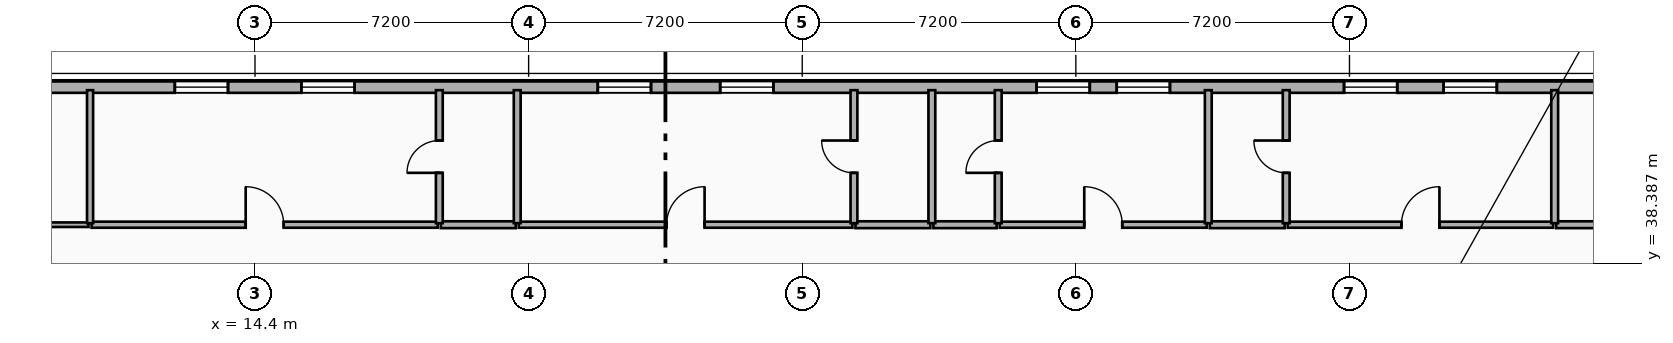
"""IFC4 building model, lengths in metres.
Left out: names, types, materials, properties, quantities, classifications, styles, units other than length and angle.
Written with IfcOpenShell. Run it as: python <this file> out.ifc"""

import sys

from ifc_helpers import new_model, si_unit, direction, frame, frame_2d, origin, place, context, subcontext, project, spatial, rectangle, extrude, element, fill, save


model = new_model("IFC4")
c1 = context("Model", 3, precision=1e-05, world=origin(), true_north=direction((0.0, 1.0)))
c2 = subcontext(c1, "Body", "Model", "MODEL_VIEW")
j1 = project(units=[si_unit("LENGTHUNIT", "METRE"), si_unit("PLANEANGLEUNIT", "RADIAN")], contexts=[c1])
p1 = place(None, origin())
s1 = spatial("IfcSite", under=j1, at=p1, CompositionType="ELEMENT")
p2 = place(p1, origin())
s2 = spatial("IfcBuilding", under=s1, at=p2, CompositionType="ELEMENT")
p3 = place(p2, frame((0.0, 0.0, 108.3)))
s3 = spatial("IfcBuildingStorey", under=s2, at=p3, CompositionType="ELEMENT", Elevation=108.3)
p4 = place(p3, frame((4.2, 43.02, 0.0), z_axis=(0.0, 0.0, 1.0), x_axis=(1.0, 0.0, 0.0)))
e1 = element("IfcWall", 1, at=p4, inside=s3, PredefinedType="SOLIDWALL", context=c2, shape_type="SweptSolid", body=[
    extrude(rectangle(XDim=49.2, YDim=0.3, at=frame_2d((24.6, 0.0))), origin(), (0.0, 0.0, 1.0), 3.24),
])
p5 = place(p4, frame((8.09, 0.0, 0.85)))
e2 = element("IfcOpeningElement", 2, at=p5, cuts=e1, PredefinedType="OPENING", context=c2, shape_type="SweptSolid", body=[
    extrude(rectangle(XDim=1.4, YDim=1.8, at=frame_2d((0.7, 0.9))), frame((0.0, 0.16, 0.0), z_axis=(0.0, -1.0, 0.0), x_axis=(1.0, 0.0, 0.0)), (0.0, 0.0, 1.0), 0.32),
])
p6 = place(p4, frame((11.42, 0.0, 0.85)))
e3 = element("IfcOpeningElement", 3, at=p6, cuts=e1, PredefinedType="OPENING", context=c2, shape_type="SweptSolid", body=[
    extrude(rectangle(XDim=1.4, YDim=1.8, at=frame_2d((0.7, 0.9))), frame((0.0, 0.16, 0.0), z_axis=(0.0, -1.0, 0.0), x_axis=(1.0, 0.0, 0.0)), (0.0, 0.0, 1.0), 0.32),
])
p7 = place(p4, frame((19.22, 0.0, 0.85)))
e4 = element("IfcOpeningElement", 4, at=p7, cuts=e1, PredefinedType="OPENING", context=c2, shape_type="SweptSolid", body=[
    extrude(rectangle(XDim=1.4, YDim=1.8, at=frame_2d((0.7, 0.9))), frame((0.0, 0.16, 0.0), z_axis=(0.0, -1.0, 0.0), x_axis=(1.0, 0.0, 0.0)), (0.0, 0.0, 1.0), 0.32),
])
p8 = place(p4, frame((22.441, 0.0, 0.85)))
e5 = element("IfcOpeningElement", 5, at=p8, cuts=e1, PredefinedType="OPENING", context=c2, shape_type="SweptSolid", body=[
    extrude(rectangle(XDim=1.4, YDim=1.8, at=frame_2d((0.7, 0.9))), frame((0.0, 0.16, 0.0), z_axis=(0.0, -1.0, 0.0), x_axis=(1.0, 0.0, 0.0)), (0.0, 0.0, 1.0), 0.32),
])
p9 = place(p4, frame((30.766, 0.0, 0.85)))
e6 = element("IfcOpeningElement", 6, at=p9, cuts=e1, PredefinedType="OPENING", context=c2, shape_type="SweptSolid", body=[
    extrude(rectangle(XDim=1.4, YDim=1.8, at=frame_2d((0.7, 0.9))), frame((0.0, 0.16, 0.0), z_axis=(0.0, -1.0, 0.0), x_axis=(1.0, 0.0, 0.0)), (0.0, 0.0, 1.0), 0.32),
])
p10 = place(p4, frame((32.876, 0.0, 0.85)))
e7 = element("IfcOpeningElement", 7, at=p10, cuts=e1, PredefinedType="OPENING", context=c2, shape_type="SweptSolid", body=[
    extrude(rectangle(XDim=1.4, YDim=1.8, at=frame_2d((0.7, 0.9))), frame((0.0, 0.16, 0.0), z_axis=(0.0, -1.0, 0.0), x_axis=(1.0, 0.0, 0.0)), (0.0, 0.0, 1.0), 0.32),
])
p11 = place(p4, frame((38.857, 0.0, 0.85)))
e8 = element("IfcOpeningElement", 8, at=p11, cuts=e1, PredefinedType="OPENING", context=c2, shape_type="SweptSolid", body=[
    extrude(rectangle(XDim=1.4, YDim=1.8, at=frame_2d((0.7, 0.9))), frame((0.0, 0.16, 0.0), z_axis=(0.0, -1.0, 0.0), x_axis=(1.0, 0.0, 0.0)), (0.0, 0.0, 1.0), 0.32),
])
p12 = place(p4, frame((41.478, 0.0, 0.85)))
e9 = element("IfcOpeningElement", 9, at=p12, cuts=e1, PredefinedType="OPENING", context=c2, shape_type="SweptSolid", body=[
    extrude(rectangle(XDim=1.4, YDim=1.8, at=frame_2d((0.7, 0.9))), frame((0.0, 0.16, 0.0), z_axis=(0.0, -1.0, 0.0), x_axis=(1.0, 0.0, 0.0)), (0.0, 0.0, 1.0), 0.32),
])
p13 = place(p4, frame((47.115, 0.0, 0.85)))
e10 = element("IfcOpeningElement", 10, at=p13, cuts=e1, PredefinedType="OPENING", context=c2, shape_type="SweptSolid", body=[
    extrude(rectangle(XDim=1.4, YDim=1.8, at=frame_2d((0.7, 0.9))), frame((0.0, 0.16, 0.0), z_axis=(0.0, -1.0, 0.0), x_axis=(1.0, 0.0, 0.0)), (0.0, 0.0, 1.0), 0.32),
])
p14 = place(p3, frame((0.26, 39.4, 0.0), z_axis=(0.0, 0.0, 1.0), x_axis=(1.0, 0.0, 0.0)))
e11 = element("IfcWall", 11, at=p14, inside=s3, PredefinedType="PARTITIONING", context=c2, shape_type="SweptSolid", body=[
    extrude(rectangle(XDim=9.76, YDim=0.12, at=frame_2d((4.88, 0.0))), origin(), (0.0, 0.0, 1.0), 3.24),
])
p15 = place(p14, frame((4.43, 0.0, 0.0)))
e12 = element("IfcOpeningElement", 12, at=p15, cuts=e11, PredefinedType="OPENING", context=c2, shape_type="SweptSolid", body=[
    extrude(rectangle(XDim=0.9, YDim=2.1, at=frame_2d((0.45, 1.05))), frame((0.0, 0.07, 0.0), z_axis=(0.0, -1.0, 0.0), x_axis=(1.0, 0.0, 0.0)), (0.0, 0.0, 1.0), 0.14),
])
p16 = place(p3, frame((10.1, 39.4, 0.0), z_axis=(0.0, 0.0, 1.0), x_axis=(1.0, 0.0, 0.0)))
e13 = element("IfcWall", 13, at=p16, inside=s3, PredefinedType="PARTITIONING", context=c2, shape_type="SweptSolid", body=[
    extrude(rectangle(XDim=9.11, YDim=0.16, at=frame_2d((4.555, 0.0))), origin(), (0.0, 0.0, 1.0), 3.24),
])
p17 = place(p16, frame((4.055, 0.0, 0.0)))
e14 = element("IfcOpeningElement", 14, at=p17, cuts=e13, PredefinedType="OPENING", context=c2, shape_type="SweptSolid", body=[
    extrude(rectangle(XDim=1.0, YDim=2.15, at=frame_2d((0.5, 1.075))), frame((0.0, 0.09, 0.0), z_axis=(0.0, -1.0, 0.0), x_axis=(1.0, 0.0, 0.0)), (0.0, 0.0, 1.0), 0.18),
])
p18 = place(p3, frame((19.29, 39.4, 0.0), z_axis=(0.0, 0.0, 1.0), x_axis=(1.0, 0.0, 0.0)))
e15 = element("IfcWall", 15, at=p18, inside=s3, PredefinedType="PLUMBINGWALL", context=c2, shape_type="SweptSolid", body=[
    extrude(rectangle(XDim=1.97, YDim=0.18, at=frame_2d((0.985, 0.0))), origin(), (0.0, 0.0, 1.0), 3.24),
])
p19 = place(p3, frame((21.34, 39.4, 0.0), z_axis=(0.0, 0.0, 1.0), x_axis=(1.0, 0.0, 0.0)))
e16 = element("IfcWall", 16, at=p19, inside=s3, PredefinedType="PARTITIONING", context=c2, shape_type="SweptSolid", body=[
    extrude(rectangle(XDim=8.781, YDim=0.16, at=frame_2d((4.391, 0.0))), origin(), (0.0, 0.0, 1.0), 3.24),
])
p20 = place(p19, frame((3.89, 0.0, 0.0)))
e17 = element("IfcOpeningElement", 17, at=p20, cuts=e16, PredefinedType="OPENING", context=c2, shape_type="SweptSolid", body=[
    extrude(rectangle(XDim=1.0, YDim=2.15, at=frame_2d((0.5, 1.075))), frame((0.0, 0.09, 0.0), z_axis=(0.0, -1.0, 0.0), x_axis=(1.0, 0.0, 0.0)), (0.0, 0.0, 1.0), 0.18),
])
p21 = place(p3, frame((30.201, 39.4, 0.0), z_axis=(0.0, 0.0, 1.0), x_axis=(1.0, 0.0, 0.0)))
e18 = element("IfcWall", 18, at=p21, inside=s3, PredefinedType="PLUMBINGWALL", context=c2, shape_type="SweptSolid", body=[
    extrude(rectangle(XDim=1.97, YDim=0.18, at=frame_2d((0.985, 0.0))), origin(), (0.0, 0.0, 1.0), 3.24),
])
p22 = place(p3, frame((33.997, 39.4, 0.0), z_axis=(0.0, 0.0, 1.0), x_axis=(1.0, 0.0, 0.0)))
e19 = element("IfcWall", 19, at=p22, inside=s3, PredefinedType="PARTITIONING", context=c2, shape_type="SweptSolid", body=[
    extrude(rectangle(XDim=5.448, YDim=0.16, at=frame_2d((2.724, 0.0))), origin(), (0.0, 0.0, 1.0), 3.24),
])
p23 = place(p22, frame((2.224, 0.0, 0.0)))
e20 = element("IfcOpeningElement", 20, at=p23, cuts=e19, PredefinedType="OPENING", context=c2, shape_type="SweptSolid", body=[
    extrude(rectangle(XDim=1.0, YDim=2.15, at=frame_2d((0.5, 1.075))), frame((0.0, 0.09, 0.0), z_axis=(0.0, -1.0, 0.0), x_axis=(1.0, 0.0, 0.0)), (0.0, 0.0, 1.0), 0.18),
])
p24 = place(p3, frame((32.251, 39.4, 0.0), z_axis=(0.0, 0.0, 1.0), x_axis=(1.0, 0.0, 0.0)))
e21 = element("IfcWall", 21, at=p24, inside=s3, PredefinedType="PLUMBINGWALL", context=c2, shape_type="SweptSolid", body=[
    extrude(rectangle(XDim=1.666, YDim=0.18, at=frame_2d((0.833, 0.0))), origin(), (0.0, 0.0, 1.0), 3.24),
])
p25 = place(p3, frame((41.575, 39.4, 0.0), z_axis=(0.0, 0.0, 1.0), x_axis=(1.0, 0.0, 0.0)))
e22 = element("IfcWall", 22, at=p25, inside=s3, PredefinedType="PARTITIONING", context=c2, shape_type="SweptSolid", body=[
    extrude(rectangle(XDim=6.985, YDim=0.16, at=frame_2d((3.493, 0.0))), origin(), (0.0, 0.0, 1.0), 3.24),
])
p26 = place(p25, frame((2.992, 0.0, 0.0)))
e23 = element("IfcOpeningElement", 23, at=p26, cuts=e22, PredefinedType="OPENING", context=c2, shape_type="SweptSolid", body=[
    extrude(rectangle(XDim=1.0, YDim=2.15, at=frame_2d((0.5, 1.075))), frame((0.0, 0.09, 0.0), z_axis=(0.0, -1.0, 0.0), x_axis=(1.0, 0.0, 0.0)), (0.0, 0.0, 1.0), 0.18),
])
for number, where, z_axis, x_axis in (
    (24, (39.525, 39.4, 0.0), (0.0, 0.0, 1.0), (1.0, 0.0, 0.0)),
    (25, (48.64, 39.4, 0.0), (0.0, 0.0, 1.0), (1.0, 0.0, 0.0)),
):
    element("IfcWall", number, at=place(p3, frame(where, z_axis=z_axis, x_axis=x_axis)), inside=s3, PredefinedType="PLUMBINGWALL", context=c2, shape_type="SweptSolid", body=[
        extrude(rectangle(XDim=1.97, YDim=0.18, at=frame_2d((0.985, 0.0))), origin(), (0.0, 0.0, 1.0), 3.24),
    ])
p27 = place(p3, frame((10.06, 39.44, 0.0), z_axis=(0.0, 0.0, 1.0), x_axis=(0.0, 1.0, 0.0)))
e26 = element("IfcWall", 26, at=p27, inside=s3, PredefinedType="PARTITIONING", context=c2, shape_type="SweptSolid", body=[
    extrude(rectangle(XDim=3.5, YDim=0.16, at=frame_2d((1.75, 0.0))), origin(), (0.0, 0.0, 1.0), 3.24),
])
p28 = place(p3, frame((19.25, 39.44, 0.0), z_axis=(0.0, 0.0, 1.0), x_axis=(0.0, 1.0, 0.0)))
e27 = element("IfcWall", 27, at=p28, inside=s3, PredefinedType="PLUMBINGWALL", context=c2, shape_type="SweptSolid", body=[
    extrude(rectangle(XDim=3.5, YDim=0.18, at=frame_2d((1.75, 0.0))), origin(), (0.0, 0.0, 1.0), 3.24),
])
p29 = place(p28, frame((1.325, 0.0, 0.0)))
e28 = element("IfcOpeningElement", 28, at=p29, cuts=e27, PredefinedType="OPENING", context=c2, shape_type="SweptSolid", body=[
    extrude(rectangle(XDim=0.85, YDim=2.1, at=frame_2d((0.425, 1.05))), frame((0.0, 0.1, 0.0), z_axis=(0.0, -1.0, 0.0), x_axis=(1.0, 0.0, 0.0)), (0.0, 0.0, 1.0), 0.2),
])
p30 = place(p3, frame((21.3, 39.44, 0.0), z_axis=(0.0, 0.0, 1.0), x_axis=(0.0, 1.0, 0.0)))
e29 = element("IfcWall", 29, at=p30, inside=s3, PredefinedType="PLUMBINGWALL", context=c2, shape_type="SweptSolid", body=[
    extrude(rectangle(XDim=3.5, YDim=0.18, at=frame_2d((1.75, 0.0))), origin(), (0.0, 0.0, 1.0), 3.24),
])
p31 = place(p3, frame((30.161, 39.44, 0.0), z_axis=(0.0, 0.0, 1.0), x_axis=(0.0, 1.0, 0.0)))
e30 = element("IfcWall", 30, at=p31, inside=s3, PredefinedType="PLUMBINGWALL", context=c2, shape_type="SweptSolid", body=[
    extrude(rectangle(XDim=3.5, YDim=0.18, at=frame_2d((1.75, 0.0))), origin(), (0.0, 0.0, 1.0), 3.24),
])
p32 = place(p31, frame((1.325, 0.0, 0.0)))
e31 = element("IfcOpeningElement", 31, at=p32, cuts=e30, PredefinedType="OPENING", context=c2, shape_type="SweptSolid", body=[
    extrude(rectangle(XDim=0.85, YDim=2.1, at=frame_2d((0.425, 1.05))), frame((0.0, 0.1, 0.0), z_axis=(0.0, -1.0, 0.0), x_axis=(1.0, 0.0, 0.0)), (0.0, 0.0, 1.0), 0.2),
])
p33 = place(p3, frame((32.211, 39.44, 0.0), z_axis=(0.0, 0.0, 1.0), x_axis=(0.0, 1.0, 0.0)))
e32 = element("IfcWall", 32, at=p33, inside=s3, PredefinedType="PLUMBINGWALL", context=c2, shape_type="SweptSolid", body=[
    extrude(rectangle(XDim=3.5, YDim=0.18, at=frame_2d((1.75, 0.0))), origin(), (0.0, 0.0, 1.0), 3.24),
])
p34 = place(p3, frame((33.957, 39.44, 0.0), z_axis=(0.0, 0.0, 1.0), x_axis=(0.0, 1.0, 0.0)))
e33 = element("IfcWall", 33, at=p34, inside=s3, PredefinedType="PLUMBINGWALL", context=c2, shape_type="SweptSolid", body=[
    extrude(rectangle(XDim=3.5, YDim=0.18, at=frame_2d((1.75, 0.0))), origin(), (0.0, 0.0, 1.0), 3.24),
])
p35 = place(p34, frame((1.325, 0.0, 0.0)))
e34 = element("IfcOpeningElement", 34, at=p35, cuts=e33, PredefinedType="OPENING", context=c2, shape_type="SweptSolid", body=[
    extrude(rectangle(XDim=0.85, YDim=2.1, at=frame_2d((0.425, 1.05))), frame((0.0, 0.1, 0.0), z_axis=(0.0, -1.0, 0.0), x_axis=(1.0, 0.0, 0.0)), (0.0, 0.0, 1.0), 0.2),
])
p36 = place(p3, frame((39.485, 39.44, 0.0), z_axis=(0.0, 0.0, 1.0), x_axis=(0.0, 1.0, 0.0)))
e35 = element("IfcWall", 35, at=p36, inside=s3, PredefinedType="PLUMBINGWALL", context=c2, shape_type="SweptSolid", body=[
    extrude(rectangle(XDim=3.5, YDim=0.18, at=frame_2d((1.75, 0.0))), origin(), (0.0, 0.0, 1.0), 3.24),
])
p37 = place(p3, frame((41.535, 39.44, 0.0), z_axis=(0.0, 0.0, 1.0), x_axis=(0.0, 1.0, 0.0)))
e36 = element("IfcWall", 36, at=p37, inside=s3, PredefinedType="PLUMBINGWALL", context=c2, shape_type="SweptSolid", body=[
    extrude(rectangle(XDim=3.5, YDim=0.18, at=frame_2d((1.75, 0.0))), origin(), (0.0, 0.0, 1.0), 3.24),
])
p38 = place(p37, frame((1.325, 0.0, 0.0)))
e37 = element("IfcOpeningElement", 37, at=p38, cuts=e36, PredefinedType="OPENING", context=c2, shape_type="SweptSolid", body=[
    extrude(rectangle(XDim=0.85, YDim=2.1, at=frame_2d((0.425, 1.05))), frame((0.0, 0.1, 0.0), z_axis=(0.0, -1.0, 0.0), x_axis=(1.0, 0.0, 0.0)), (0.0, 0.0, 1.0), 0.2),
])
p39 = place(p3, frame((48.6, 39.44, 0.0), z_axis=(0.0, 0.0, 1.0), x_axis=(0.0, 1.0, 0.0)))
e38 = element("IfcWall", 38, at=p39, inside=s3, PredefinedType="PLUMBINGWALL", context=c2, shape_type="SweptSolid", body=[
    extrude(rectangle(XDim=3.5, YDim=0.18, at=frame_2d((1.75, 0.0))), origin(), (0.0, 0.0, 1.0), 3.24),
])
p40 = place(p5, origin())
e39 = element("IfcWindow", 39, at=p40, inside=s3, PartitioningType="SINGLE_PANEL", PredefinedType="WINDOW", context=c2, shape_type="SweptSolid", body=[
    extrude(rectangle(XDim=1.4, YDim=1.8, at=frame_2d((0.7, 0.9))), frame((0.0, 0.03, 0.0), z_axis=(0.0, -1.0, 0.0), x_axis=(1.0, 0.0, 0.0)), (0.0, 0.0, 1.0), 0.06),
])
fill(e2, e39)
p41 = place(p6, origin())
e40 = element("IfcWindow", 40, at=p41, inside=s3, PartitioningType="SINGLE_PANEL", PredefinedType="WINDOW", context=c2, shape_type="SweptSolid", body=[
    extrude(rectangle(XDim=1.4, YDim=1.8, at=frame_2d((0.7, 0.9))), frame((0.0, 0.03, 0.0), z_axis=(0.0, -1.0, 0.0), x_axis=(1.0, 0.0, 0.0)), (0.0, 0.0, 1.0), 0.06),
])
fill(e3, e40)
p42 = place(p7, origin())
e41 = element("IfcWindow", 41, at=p42, inside=s3, PartitioningType="SINGLE_PANEL", PredefinedType="WINDOW", context=c2, shape_type="SweptSolid", body=[
    extrude(rectangle(XDim=1.4, YDim=1.8, at=frame_2d((0.7, 0.9))), frame((0.0, 0.03, 0.0), z_axis=(0.0, -1.0, 0.0), x_axis=(1.0, 0.0, 0.0)), (0.0, 0.0, 1.0), 0.06),
])
fill(e4, e41)
p43 = place(p8, origin())
e42 = element("IfcWindow", 42, at=p43, inside=s3, PartitioningType="SINGLE_PANEL", PredefinedType="WINDOW", context=c2, shape_type="SweptSolid", body=[
    extrude(rectangle(XDim=1.4, YDim=1.8, at=frame_2d((0.7, 0.9))), frame((0.0, 0.03, 0.0), z_axis=(0.0, -1.0, 0.0), x_axis=(1.0, 0.0, 0.0)), (0.0, 0.0, 1.0), 0.06),
])
fill(e5, e42)
p44 = place(p9, origin())
e43 = element("IfcWindow", 43, at=p44, inside=s3, PartitioningType="SINGLE_PANEL", PredefinedType="WINDOW", context=c2, shape_type="SweptSolid", body=[
    extrude(rectangle(XDim=1.4, YDim=1.8, at=frame_2d((0.7, 0.9))), frame((0.0, 0.03, 0.0), z_axis=(0.0, -1.0, 0.0), x_axis=(1.0, 0.0, 0.0)), (0.0, 0.0, 1.0), 0.06),
])
fill(e6, e43)
p45 = place(p10, origin())
e44 = element("IfcWindow", 44, at=p45, inside=s3, PartitioningType="SINGLE_PANEL", PredefinedType="WINDOW", context=c2, shape_type="SweptSolid", body=[
    extrude(rectangle(XDim=1.4, YDim=1.8, at=frame_2d((0.7, 0.9))), frame((0.0, 0.03, 0.0), z_axis=(0.0, -1.0, 0.0), x_axis=(1.0, 0.0, 0.0)), (0.0, 0.0, 1.0), 0.06),
])
fill(e7, e44)
p46 = place(p11, origin())
e45 = element("IfcWindow", 45, at=p46, inside=s3, PartitioningType="SINGLE_PANEL", PredefinedType="WINDOW", context=c2, shape_type="SweptSolid", body=[
    extrude(rectangle(XDim=1.4, YDim=1.8, at=frame_2d((0.7, 0.9))), frame((0.0, 0.03, 0.0), z_axis=(0.0, -1.0, 0.0), x_axis=(1.0, 0.0, 0.0)), (0.0, 0.0, 1.0), 0.06),
])
fill(e8, e45)
p47 = place(p12, origin())
e46 = element("IfcWindow", 46, at=p47, inside=s3, PartitioningType="SINGLE_PANEL", PredefinedType="WINDOW", context=c2, shape_type="SweptSolid", body=[
    extrude(rectangle(XDim=1.4, YDim=1.8, at=frame_2d((0.7, 0.9))), frame((0.0, 0.03, 0.0), z_axis=(0.0, -1.0, 0.0), x_axis=(1.0, 0.0, 0.0)), (0.0, 0.0, 1.0), 0.06),
])
fill(e9, e46)
p48 = place(p17, origin())
e47 = element("IfcDoor", 47, at=p48, inside=s3, OperationType="SINGLE_SWING_LEFT", PredefinedType="DOOR", context=c2, shape_type="SweptSolid", body=[
    extrude(rectangle(XDim=1.0, YDim=2.15, at=frame_2d((0.5, 1.075))), frame((0.0, 0.025, 0.0), z_axis=(0.0, -1.0, 0.0), x_axis=(1.0, 0.0, 0.0)), (0.0, 0.0, 1.0), 0.05),
])
fill(e14, e47)
p49 = place(p20, origin())
e48 = element("IfcDoor", 48, at=p49, inside=s3, OperationType="SINGLE_SWING_RIGHT", PredefinedType="DOOR", context=c2, shape_type="SweptSolid", body=[
    extrude(rectangle(XDim=1.0, YDim=2.15, at=frame_2d((0.5, 1.075))), frame((0.0, 0.025, 0.0), z_axis=(0.0, -1.0, 0.0), x_axis=(1.0, 0.0, 0.0)), (0.0, 0.0, 1.0), 0.05),
])
fill(e17, e48)
p50 = place(p23, origin())
e49 = element("IfcDoor", 49, at=p50, inside=s3, OperationType="SINGLE_SWING_LEFT", PredefinedType="DOOR", context=c2, shape_type="SweptSolid", body=[
    extrude(rectangle(XDim=1.0, YDim=2.15, at=frame_2d((0.5, 1.075))), frame((0.0, 0.025, 0.0), z_axis=(0.0, -1.0, 0.0), x_axis=(1.0, 0.0, 0.0)), (0.0, 0.0, 1.0), 0.05),
])
fill(e20, e49)
p51 = place(p26, origin())
e50 = element("IfcDoor", 50, at=p51, inside=s3, OperationType="SINGLE_SWING_RIGHT", PredefinedType="DOOR", context=c2, shape_type="SweptSolid", body=[
    extrude(rectangle(XDim=1.0, YDim=2.15, at=frame_2d((0.5, 1.075))), frame((0.0, 0.025, 0.0), z_axis=(0.0, -1.0, 0.0), x_axis=(1.0, 0.0, 0.0)), (0.0, 0.0, 1.0), 0.05),
])
fill(e23, e50)
p52 = place(p29, origin())
e51 = element("IfcDoor", 51, at=p52, inside=s3, OperationType="SINGLE_SWING_LEFT", PredefinedType="DOOR", context=c2, shape_type="SweptSolid", body=[
    extrude(rectangle(XDim=0.85, YDim=2.1, at=frame_2d((0.425, 1.05))), frame((0.0, 0.025, 0.0), z_axis=(0.0, -1.0, 0.0), x_axis=(1.0, 0.0, 0.0)), (0.0, 0.0, 1.0), 0.05),
])
fill(e28, e51)
p53 = place(p32, origin())
e52 = element("IfcDoor", 52, at=p53, inside=s3, OperationType="SINGLE_SWING_RIGHT", PredefinedType="DOOR", context=c2, shape_type="SweptSolid", body=[
    extrude(rectangle(XDim=0.85, YDim=2.1, at=frame_2d((0.425, 1.05))), frame((0.0, 0.025, 0.0), z_axis=(0.0, -1.0, 0.0), x_axis=(1.0, 0.0, 0.0)), (0.0, 0.0, 1.0), 0.05),
])
fill(e31, e52)
p54 = place(p35, origin())
e53 = element("IfcDoor", 53, at=p54, inside=s3, OperationType="SINGLE_SWING_LEFT", PredefinedType="DOOR", context=c2, shape_type="SweptSolid", body=[
    extrude(rectangle(XDim=0.85, YDim=2.1, at=frame_2d((0.425, 1.05))), frame((0.0, 0.025, 0.0), z_axis=(0.0, -1.0, 0.0), x_axis=(1.0, 0.0, 0.0)), (0.0, 0.0, 1.0), 0.05),
])
fill(e34, e53)
p55 = place(p38, origin())
e54 = element("IfcDoor", 54, at=p55, inside=s3, OperationType="SINGLE_SWING_RIGHT", PredefinedType="DOOR", context=c2, shape_type="SweptSolid", body=[
    extrude(rectangle(XDim=0.85, YDim=2.1, at=frame_2d((0.425, 1.05))), frame((0.0, 0.025, 0.0), z_axis=(0.0, -1.0, 0.0), x_axis=(1.0, 0.0, 0.0)), (0.0, 0.0, 1.0), 0.05),
])
fill(e37, e54)
save(model, sys.argv[1])
